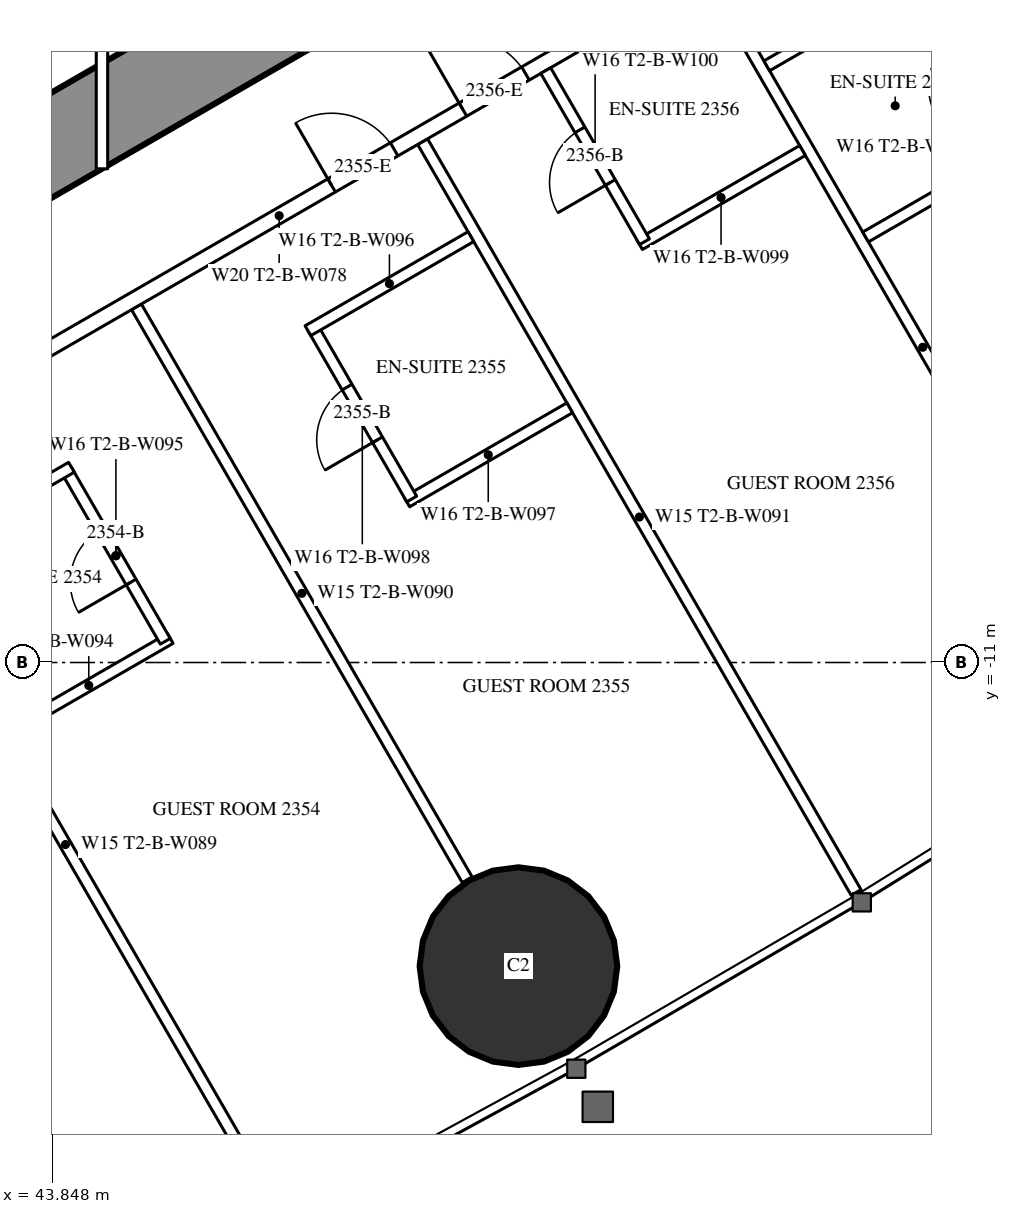
"""IFC4 building model, lengths in metres.
Left out: names, types, materials, properties, quantities, classifications, styles, units other than length and angle.
Written with IfcOpenShell. Run it as: python <this file> out.ifc"""

import sys

from ifc_helpers import new_model, si_unit, direction, frame, frame_2d, origin, origin_2d, place, context, subcontext, project, spatial, rectangle, hollow_circle, extrude, element, fill, save


model = new_model("IFC4")
c1 = context("Model", 3, precision=1e-05, world=origin(), true_north=direction((0.0, 1.0)))
c2 = subcontext(c1, "Body", "Model", "MODEL_VIEW")
j1 = project(units=[si_unit("LENGTHUNIT", "METRE"), si_unit("PLANEANGLEUNIT", "RADIAN")], contexts=[c1])
p1 = place(None, origin())
s1 = spatial("IfcSite", under=j1, at=p1, CompositionType="ELEMENT")
p2 = place(p1, origin())
s2 = spatial("IfcBuilding", under=s1, at=p2, CompositionType="ELEMENT")
p3 = place(p2, frame((0.0, 0.0, 90.6)))
s3 = spatial("IfcBuildingStorey", under=s2, at=p3, CompositionType="ELEMENT", Elevation=90.6)
p4 = place(p3, frame((49.979, -14.994, 0.0), z_axis=(0.0, 0.0, 1.0), x_axis=(1.0, 0.0, 0.0)))
e1 = element("IfcColumn", 1, at=p4, inside=s3, PredefinedType="COLUMN", context=c2, shape_type="SweptSolid", body=[
    extrude(hollow_circle(Radius=1.3, WallThickness=0.1, at=origin_2d()), origin(), (0.0, 0.0, 1.0), 3.5),
])
p5 = place(p3, frame((27.2, -13.8, 0.0), z_axis=(0.0, 0.0, 1.0), x_axis=(0.866027159892, 0.499996958321, 0.0)))
e2 = element("IfcWall", 2, at=p5, inside=s3, PredefinedType="SHEAR", context=c2, shape_type="SweptSolid", body=[
    extrude(rectangle(XDim=27.947, YDim=1.2, at=frame_2d((13.973, 0.0))), origin(), (0.0, 0.0, 1.0), 3.5),
])
p6 = place(p5, frame((4.6, 0.0, 0.0)))
e3 = element("IfcOpeningElement", 3, at=p6, cuts=e2, PredefinedType="OPENING", context=c2, shape_type="SweptSolid", body=[
    extrude(rectangle(XDim=1.0, YDim=2.2, at=frame_2d((0.5, 1.1))), frame((0.0, 0.61, 0.0), z_axis=(0.0, -1.0, 0.0), x_axis=(1.0, 0.0, 0.0)), (0.0, 0.0, 1.0), 1.22),
])
p7 = place(p5, frame((13.395, 0.0, 0.0)))
e4 = element("IfcOpeningElement", 4, at=p7, cuts=e2, PredefinedType="OPENING", context=c2, shape_type="SweptSolid", body=[
    extrude(rectangle(XDim=1.8, YDim=2.2, at=frame_2d((0.9, 1.1))), frame((0.0, 0.61, 0.0), z_axis=(0.0, -1.0, 0.0), x_axis=(1.0, 0.0, 0.0)), (0.0, 0.0, 1.0), 1.22),
])
p8 = place(p3, frame((41.19, -8.494, 0.0), z_axis=(0.0, 0.0, 1.0), x_axis=(0.49999258054, -0.866029687369, 0.0)))
e5 = element("IfcWall", 5, at=p8, inside=s3, PredefinedType="PARTITIONING", context=c2, shape_type="SweptSolid", body=[
    extrude(rectangle(XDim=11.318, YDim=0.15, at=frame_2d((5.659, 0.0))), origin(), (0.0, 0.0, 1.0), 3.25),
])
p9 = place(p3, frame((44.954, -6.321, 0.0), z_axis=(0.0, 0.0, 1.0), x_axis=(0.500018676722, -0.866014620505, 0.0)))
e6 = element("IfcWall", 6, at=p9, inside=s3, PredefinedType="PARTITIONING", context=c2, shape_type="SweptSolid", body=[
    extrude(rectangle(XDim=8.704, YDim=0.15, at=frame_2d((4.352, 0.0))), origin(), (0.0, 0.0, 1.0), 2.2),
])
p10 = place(p3, frame((48.719, -4.147, 0.0), z_axis=(0.0, 0.0, 1.0), x_axis=(0.499990498062, -0.866030889661, 0.0)))
e7 = element("IfcWall", 7, at=p10, inside=s3, PredefinedType="PARTITIONING", context=c2, shape_type="SweptSolid", body=[
    extrude(rectangle(XDim=11.406, YDim=0.15, at=frame_2d((5.703, 0.0))), origin(), (0.0, 0.0, 1.0), 3.25),
])
p11 = place(p3, frame((52.481, -1.975, 0.0), z_axis=(0.0, 0.0, 1.0), x_axis=(0.500003867771, -0.866023170714, 0.0)))
e8 = element("IfcWall", 8, at=p11, inside=s3, PredefinedType="PARTITIONING", context=c2, shape_type="SweptSolid", body=[
    extrude(rectangle(XDim=11.265, YDim=0.15, at=frame_2d((5.632, 0.0))), origin(), (0.0, 0.0, 1.0), 3.25),
])
p12 = place(p3, frame((37.96, -10.243, 0.0), z_axis=(0.0, 0.0, 1.0), x_axis=(0.866026429433, 0.499998223521, 0.0)))
e9 = element("IfcWall", 9, at=p12, inside=s3, PredefinedType="PARTITIONING", context=c2, shape_type="SweptSolid", body=[
    extrude(rectangle(XDim=20.487, YDim=0.2, at=frame_2d((10.243, 0.0))), origin(), (0.0, 0.0, 1.0), 3.25),
])
p13 = place(p12, frame((4.047, 0.0, 0.0)))
e10 = element("IfcOpeningElement", 10, at=p13, cuts=e9, PredefinedType="OPENING", context=c2, shape_type="SweptSolid", body=[
    extrude(rectangle(XDim=0.95, YDim=2.2, at=frame_2d((0.475, 1.1))), frame((0.0, 0.11, 0.0), z_axis=(0.0, -1.0, 0.0), x_axis=(1.0, 0.0, 0.0)), (0.0, 0.0, 1.0), 0.22),
])
p14 = place(p12, frame((11.04, 0.0, 0.0)))
e11 = element("IfcOpeningElement", 11, at=p14, cuts=e9, PredefinedType="OPENING", context=c2, shape_type="SweptSolid", body=[
    extrude(rectangle(XDim=0.95, YDim=2.2, at=frame_2d((0.475, 1.1))), frame((0.0, 0.11, 0.0), z_axis=(0.0, -1.0, 0.0), x_axis=(1.0, 0.0, 0.0)), (0.0, 0.0, 1.0), 0.22),
])
p15 = place(p12, frame((13.035, 0.0, 0.0)))
e12 = element("IfcOpeningElement", 12, at=p15, cuts=e9, PredefinedType="OPENING", context=c2, shape_type="SweptSolid", body=[
    extrude(rectangle(XDim=0.95, YDim=2.2, at=frame_2d((0.475, 1.1))), frame((0.0, 0.11, 0.0), z_axis=(0.0, -1.0, 0.0), x_axis=(1.0, 0.0, 0.0)), (0.0, 0.0, 1.0), 0.22),
])
p16 = place(p12, frame((17.085, 0.0, 0.0)))
e13 = element("IfcOpeningElement", 13, at=p16, cuts=e9, PredefinedType="OPENING", context=c2, shape_type="SweptSolid", body=[
    extrude(rectangle(XDim=0.95, YDim=2.2, at=frame_2d((0.475, 1.1))), frame((0.0, 0.11, 0.0), z_axis=(0.0, -1.0, 0.0), x_axis=(1.0, 0.0, 0.0)), (0.0, 0.0, 1.0), 0.22),
])
p17 = place(p12, frame((1.048, 0.0, 0.0)))
e14 = element("IfcOpeningElement", 14, at=p17, cuts=e9, PredefinedType="OPENING", context=c2, shape_type="SweptSolid", body=[
    extrude(rectangle(XDim=1.8, YDim=2.2, at=frame_2d((0.9, 1.1))), frame((0.0, 0.11, 0.0), z_axis=(0.0, -1.0, 0.0), x_axis=(1.0, 0.0, 0.0)), (0.0, 0.0, 1.0), 0.22),
])
p18 = place(p3, frame((43.255, -11.921, 0.0), z_axis=(0.0, 0.0, 1.0), x_axis=(0.866006523861, 0.500032699561, 0.0)))
e15 = element("IfcWall", 15, at=p18, inside=s3, PredefinedType="PARTITIONING", context=c2, shape_type="SweptSolid", body=[
    extrude(rectangle(XDim=2.475, YDim=0.15, at=frame_2d((1.237, 0.0))), origin(), (0.0, 0.0, 1.0), 3.25),
])
p19 = place(p3, frame((44.033, -8.469, 0.0), z_axis=(0.0, 0.0, 1.0), x_axis=(0.500047596559, -0.865997922154, 0.0)))
e16 = element("IfcWall", 16, at=p19, inside=s3, PredefinedType="PARTITIONING", context=c2, shape_type="SweptSolid", body=[
    extrude(rectangle(XDim=2.6, YDim=0.15, at=frame_2d((1.3, 0.0))), origin(), (0.0, 0.0, 1.0), 3.25),
])
p20 = place(p19, frame((0.9, 0.0, 0.0)))
e17 = element("IfcOpeningElement", 17, at=p20, cuts=e16, PredefinedType="OPENING", context=c2, shape_type="SweptSolid", body=[
    extrude(rectangle(XDim=0.8, YDim=2.2, at=frame_2d((0.4, 1.1))), frame((0.0, 0.085, 0.0), z_axis=(0.0, -1.0, 0.0), x_axis=(1.0, 0.0, 0.0)), (0.0, 0.0, 1.0), 0.17),
])
p21 = place(p3, frame((41.955, -9.669, 0.0), z_axis=(0.0, 0.0, 1.0), x_axis=(0.866006523861, 0.500032699561, 0.0)))
e18 = element("IfcWall", 18, at=p21, inside=s3, PredefinedType="PARTITIONING", context=c2, shape_type="SweptSolid", body=[
    extrude(rectangle(XDim=2.475, YDim=0.15, at=frame_2d((1.237, 0.0))), origin(), (0.0, 0.0, 1.0), 3.25),
])
p22 = place(p3, frame((48.51, -8.887, 0.0), z_axis=(0.0, 0.0, 1.0), x_axis=(0.866031185235, 0.4999899861, 0.0)))
e19 = element("IfcWall", 19, at=p22, inside=s3, PredefinedType="PARTITIONING", context=c2, shape_type="SweptSolid", body=[
    extrude(rectangle(XDim=2.475, YDim=0.15, at=frame_2d((1.238, 0.0))), origin(), (0.0, 0.0, 1.0), 3.25),
])
p23 = place(p3, frame((47.275, -6.597, 0.0), z_axis=(0.0, 0.0, 1.0), x_axis=(0.499936506574, -0.866062058628, 0.0)))
e20 = element("IfcWall", 20, at=p23, inside=s3, PredefinedType="PARTITIONING", context=c2, shape_type="SweptSolid", body=[
    extrude(rectangle(XDim=2.6, YDim=0.15, at=frame_2d((1.3, 0.0))), origin(), (0.0, 0.0, 1.0), 3.25),
])
p24 = place(p23, frame((0.9, 0.0, 0.0)))
e21 = element("IfcOpeningElement", 21, at=p24, cuts=e20, PredefinedType="OPENING", context=c2, shape_type="SweptSolid", body=[
    extrude(rectangle(XDim=0.8, YDim=2.2, at=frame_2d((0.4, 1.1))), frame((0.0, 0.085, 0.0), z_axis=(0.0, -1.0, 0.0), x_axis=(1.0, 0.0, 0.0)), (0.0, 0.0, 1.0), 0.17),
])
for number, where, z_axis, x_axis in (
    (22, (47.21, -6.635, 0.0), (0.0, 0.0, 1.0), (0.866, 0.5, 0.0)),
    (23, (51.573, -5.502, 0.0), (0.0, 0.0, 1.0), (0.866, 0.5, 0.0)),
):
    element("IfcWall", number, at=place(p3, frame(where, z_axis=z_axis, x_axis=x_axis)), inside=s3, PredefinedType="PARTITIONING", context=c2, shape_type="SweptSolid", body=[
        extrude(rectangle(XDim=2.475, YDim=0.15, at=frame_2d((1.237, 0.0))), origin(), (0.0, 0.0, 1.0), 3.25),
    ])
p25 = place(p3, frame((50.338, -3.213, 0.0), z_axis=(0.0, 0.0, 1.0), x_axis=(0.500047596559, -0.865997922154, 0.0)))
e24 = element("IfcWall", 24, at=p25, inside=s3, PredefinedType="PARTITIONING", context=c2, shape_type="SweptSolid", body=[
    extrude(rectangle(XDim=2.6, YDim=0.15, at=frame_2d((1.3, 0.0))), origin(), (0.0, 0.0, 1.0), 3.25),
])
p26 = place(p25, frame((0.9, 0.0, 0.0)))
e25 = element("IfcOpeningElement", 25, at=p26, cuts=e24, PredefinedType="OPENING", context=c2, shape_type="SweptSolid", body=[
    extrude(rectangle(XDim=0.8, YDim=2.2, at=frame_2d((0.4, 1.1))), frame((0.0, 0.085, 0.0), z_axis=(0.0, -1.0, 0.0), x_axis=(1.0, 0.0, 0.0)), (0.0, 0.0, 1.0), 0.17),
])
p27 = place(p3, frame((54.546, -5.402, 0.0), z_axis=(0.0, 0.0, 1.0), x_axis=(0.866006523861, 0.500032699561, 0.0)))
e26 = element("IfcWall", 26, at=p27, inside=s3, PredefinedType="PARTITIONING", context=c2, shape_type="SweptSolid", body=[
    extrude(rectangle(XDim=2.475, YDim=0.15, at=frame_2d((1.237, 0.0))), origin(), (0.0, 0.0, 1.0), 3.25),
])
p28 = place(p3, frame((55.325, -1.95, 0.0), z_axis=(0.0, 0.0, 1.0), x_axis=(0.500006934395, -0.866021400173, 0.0)))
e27 = element("IfcWall", 27, at=p28, inside=s3, PredefinedType="PARTITIONING", context=c2, shape_type="SweptSolid", body=[
    extrude(rectangle(XDim=2.6, YDim=0.15, at=frame_2d((1.3, 0.0))), origin(), (0.0, 0.0, 1.0), 3.25),
])
p29 = place(p28, frame((0.9, 0.0, 0.0)))
e28 = element("IfcOpeningElement", 28, at=p29, cuts=e27, PredefinedType="OPENING", context=c2, shape_type="SweptSolid", body=[
    extrude(rectangle(XDim=0.8, YDim=2.2, at=frame_2d((0.4, 1.1))), frame((0.0, 0.085, 0.0), z_axis=(0.0, -1.0, 0.0), x_axis=(1.0, 0.0, 0.0)), (0.0, 0.0, 1.0), 0.17),
])
p30 = place(p3, frame((53.246, -3.15, 0.0), z_axis=(0.0, 0.0, 1.0), x_axis=(0.866006523861, 0.500032699561, 0.0)))
e29 = element("IfcWall", 29, at=p30, inside=s3, PredefinedType="PARTITIONING", context=c2, shape_type="SweptSolid", body=[
    extrude(rectangle(XDim=2.475, YDim=0.15, at=frame_2d((1.237, 0.0))), origin(), (0.0, 0.0, 1.0), 3.25),
])
p31 = place(p3, frame((44.5, -4.505, 0.0), z_axis=(0.0, 0.0, 1.0), x_axis=(0.0, 1.0, 0.0)))
e30 = element("IfcWall", 30, at=p31, inside=s3, PredefinedType="PARTITIONING", context=c2, shape_type="SweptSolid", body=[
    extrude(rectangle(XDim=9.009, YDim=0.15, at=frame_2d((4.505, 0.0))), origin(), (0.0, 0.0, 1.0), 2.45),
])
p32 = place(p31, frame((1.752, 0.0, 0.0)))
e31 = element("IfcOpeningElement", 31, at=p32, cuts=e30, PredefinedType="OPENING", context=c2, shape_type="SweptSolid", body=[
    extrude(rectangle(XDim=1.0, YDim=2.2, at=frame_2d((0.5, 1.1))), frame((0.0, 0.085, 0.0), z_axis=(0.0, -1.0, 0.0), x_axis=(1.0, 0.0, 0.0)), (0.0, 0.0, 1.0), 0.17),
])
p33 = place(p31, frame((6.257, 0.0, 0.0)))
e32 = element("IfcOpeningElement", 32, at=p33, cuts=e30, PredefinedType="OPENING", context=c2, shape_type="SweptSolid", body=[
    extrude(rectangle(XDim=1.0, YDim=2.2, at=frame_2d((0.5, 1.1))), frame((0.0, 0.085, 0.0), z_axis=(0.0, -1.0, 0.0), x_axis=(1.0, 0.0, 0.0)), (0.0, 0.0, 1.0), 0.17),
])
p34 = place(p20, origin())
e33 = element("IfcDoor", 33, at=p34, inside=s3, OperationType="SINGLE_SWING_RIGHT", PredefinedType="DOOR", context=c2, shape_type="SweptSolid", body=[
    extrude(rectangle(XDim=0.8, YDim=2.2, at=frame_2d((0.4, 1.1))), frame((0.0, 0.025, 0.0), z_axis=(0.0, -1.0, 0.0), x_axis=(1.0, 0.0, 0.0)), (0.0, 0.0, 1.0), 0.05),
])
fill(e17, e33)
p35 = place(p24, origin())
e34 = element("IfcDoor", 34, at=p35, inside=s3, OperationType="SINGLE_SWING_RIGHT", PredefinedType="DOOR", context=c2, shape_type="SweptSolid", body=[
    extrude(rectangle(XDim=0.8, YDim=2.2, at=frame_2d((0.4, 1.1))), frame((0.0, 0.025, 0.0), z_axis=(0.0, -1.0, 0.0), x_axis=(1.0, 0.0, 0.0)), (0.0, 0.0, 1.0), 0.05),
])
fill(e21, e34)
p36 = place(p14, origin())
e35 = element("IfcDoor", 35, at=p36, inside=s3, OperationType="SINGLE_SWING_LEFT", PredefinedType="DOOR", context=c2, shape_type="SweptSolid", body=[
    extrude(rectangle(XDim=0.95, YDim=2.2, at=frame_2d((0.475, 1.1))), frame((0.0, 0.025, 0.0), z_axis=(0.0, -1.0, 0.0), x_axis=(1.0, 0.0, 0.0)), (0.0, 0.0, 1.0), 0.05),
])
fill(e11, e35)
p37 = place(p26, origin())
e36 = element("IfcDoor", 36, at=p37, inside=s3, OperationType="SINGLE_SWING_RIGHT", PredefinedType="DOOR", context=c2, shape_type="SweptSolid", body=[
    extrude(rectangle(XDim=0.8, YDim=2.2, at=frame_2d((0.4, 1.1))), frame((0.0, 0.025, 0.0), z_axis=(0.0, -1.0, 0.0), x_axis=(1.0, 0.0, 0.0)), (0.0, 0.0, 1.0), 0.05),
])
fill(e25, e36)
p38 = place(p15, origin())
e37 = element("IfcDoor", 37, at=p38, inside=s3, OperationType="SINGLE_SWING_LEFT", PredefinedType="DOOR", context=c2, shape_type="SweptSolid", body=[
    extrude(rectangle(XDim=0.95, YDim=2.2, at=frame_2d((0.475, 1.1))), frame((0.0, 0.025, 0.0), z_axis=(0.0, -1.0, 0.0), x_axis=(1.0, 0.0, 0.0)), (0.0, 0.0, 1.0), 0.05),
])
fill(e12, e37)
save(model, sys.argv[1])
